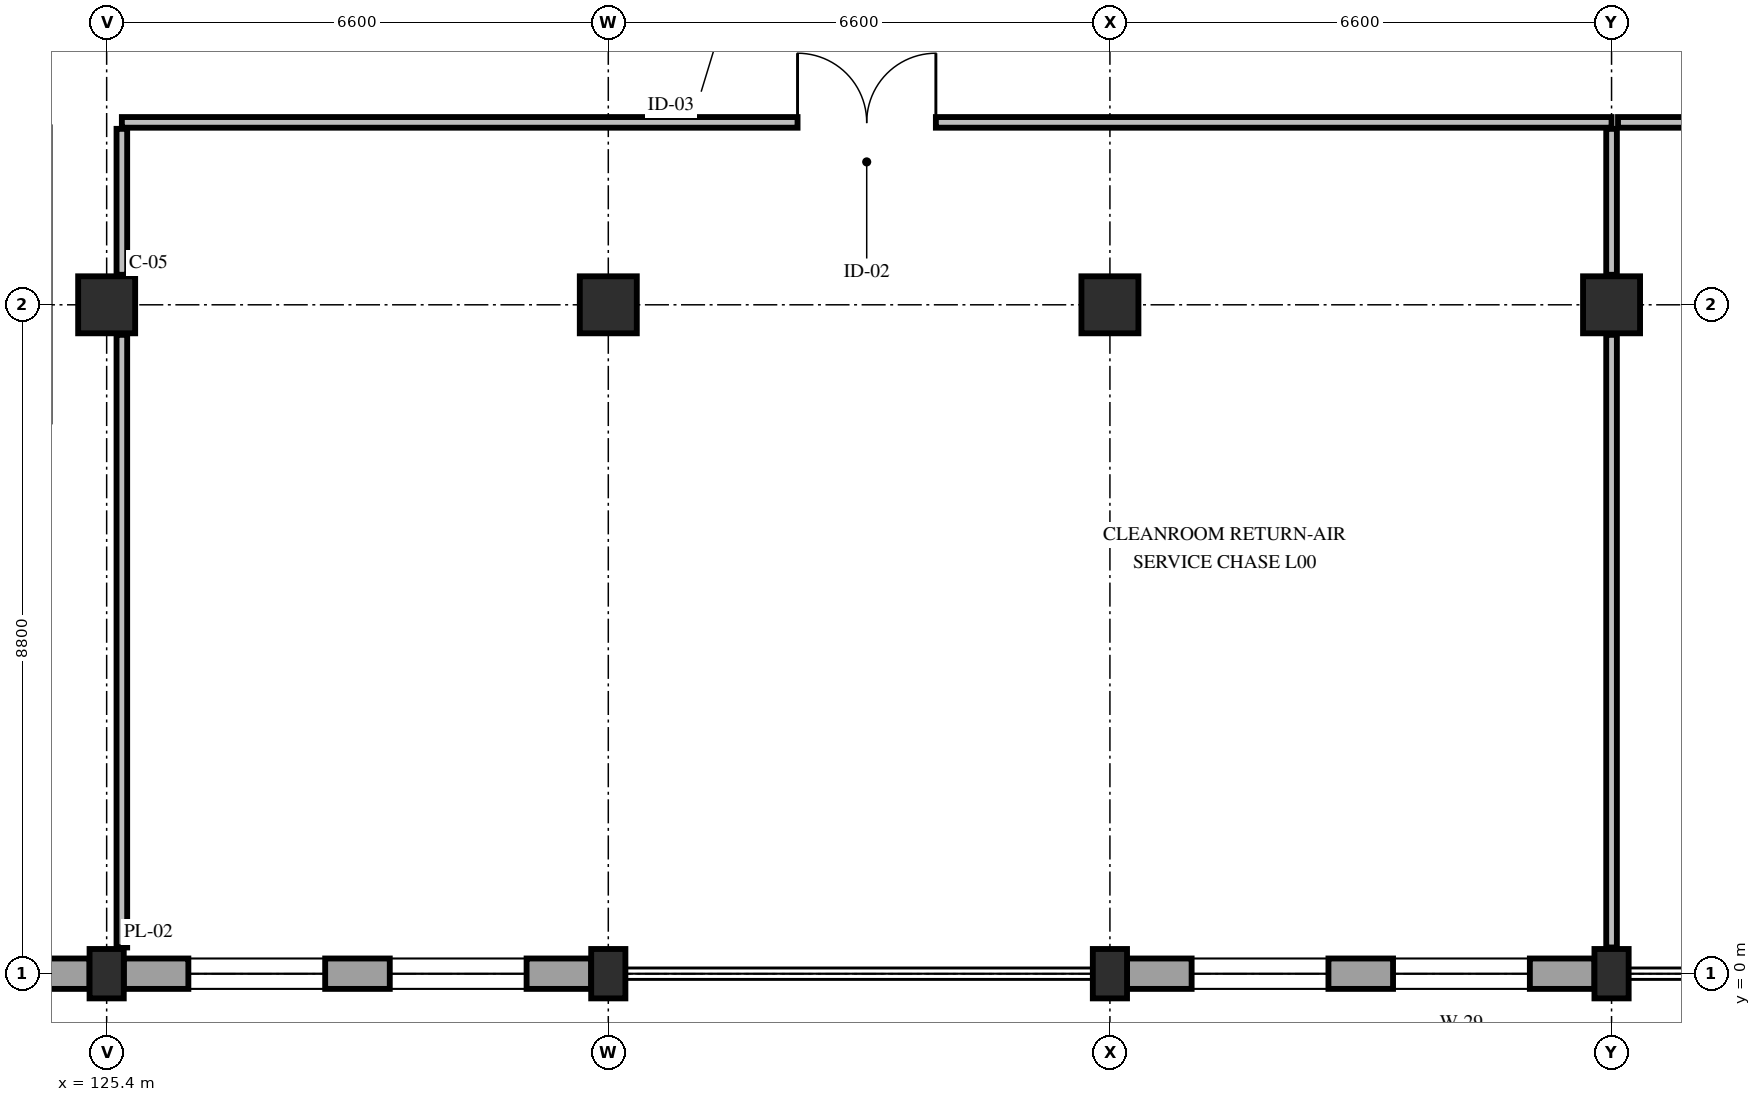
"""IFC4 building model, lengths in metres.
Left out: names, types, materials, properties, quantities, classifications, styles, units other than length and angle.
Written with IfcOpenShell. Run it as: python <this file> out.ifc"""

import sys

from ifc_helpers import new_model, si_unit, direction, frame, frame_2d, origin, origin_2d, place, context, subcontext, project, spatial, rectangle, extrude, element, fill, save


model = new_model("IFC4")
c1 = context("Model", 3, precision=1e-05, world=origin(), true_north=direction((0.0, 1.0)))
c2 = subcontext(c1, "Body", "Model", "MODEL_VIEW")
j1 = project(units=[si_unit("LENGTHUNIT", "METRE"), si_unit("PLANEANGLEUNIT", "RADIAN")], contexts=[c1])
p1 = place(None, origin())
s1 = spatial("IfcSite", under=j1, at=p1, CompositionType="ELEMENT")
p2 = place(p1, origin())
s2 = spatial("IfcBuilding", under=s1, at=p2, CompositionType="ELEMENT")
p3 = place(p2, origin())
s3 = spatial("IfcBuildingStorey", under=s2, at=p3, CompositionType="ELEMENT", Elevation=0.0)
p4 = place(p3, frame((125.4, 0.0, 0.0), z_axis=(0.0, 0.0, 1.0), x_axis=(1.0, 0.0, 0.0)))
e1 = element("IfcColumn", 1, at=p4, inside=s3, PredefinedType="PILASTER", context=c2, shape_type="SweptSolid", body=[
    extrude(rectangle(XDim=0.45, YDim=0.65, at=origin_2d()), origin(), (0.0, 0.0, 1.0), 5.4),
])
p5 = place(p3, frame((125.4, 8.8, 0.0), z_axis=(0.0, 0.0, 1.0), x_axis=(1.0, 0.0, 0.0)))
e2 = element("IfcColumn", 2, at=p5, inside=s3, PredefinedType="COLUMN", context=c2, shape_type="SweptSolid", body=[
    extrude(rectangle(XDim=0.75, YDim=0.75, at=origin_2d()), origin(), (0.0, 0.0, 1.0), 5.4),
])
p6 = place(p3, frame((132.0, 0.0, 0.0), z_axis=(0.0, 0.0, 1.0), x_axis=(1.0, 0.0, 0.0)))
e3 = element("IfcColumn", 3, at=p6, inside=s3, PredefinedType="PILASTER", context=c2, shape_type="SweptSolid", body=[
    extrude(rectangle(XDim=0.45, YDim=0.65, at=origin_2d()), origin(), (0.0, 0.0, 1.0), 5.4),
])
p7 = place(p3, frame((132.0, 8.8, 0.0), z_axis=(0.0, 0.0, 1.0), x_axis=(1.0, 0.0, 0.0)))
e4 = element("IfcColumn", 4, at=p7, inside=s3, PredefinedType="COLUMN", context=c2, shape_type="SweptSolid", body=[
    extrude(rectangle(XDim=0.75, YDim=0.75, at=origin_2d()), origin(), (0.0, 0.0, 1.0), 5.4),
])
p8 = place(p3, frame((138.6, 0.0, 0.0), z_axis=(0.0, 0.0, 1.0), x_axis=(1.0, 0.0, 0.0)))
e5 = element("IfcColumn", 5, at=p8, inside=s3, PredefinedType="PILASTER", context=c2, shape_type="SweptSolid", body=[
    extrude(rectangle(XDim=0.45, YDim=0.65, at=origin_2d()), origin(), (0.0, 0.0, 1.0), 5.4),
])
p9 = place(p3, frame((138.6, 8.8, 0.0), z_axis=(0.0, 0.0, 1.0), x_axis=(1.0, 0.0, 0.0)))
e6 = element("IfcColumn", 6, at=p9, inside=s3, PredefinedType="COLUMN", context=c2, shape_type="SweptSolid", body=[
    extrude(rectangle(XDim=0.75, YDim=0.75, at=origin_2d()), origin(), (0.0, 0.0, 1.0), 5.4),
])
p10 = place(p3, frame((145.2, 0.0, 0.0), z_axis=(0.0, 0.0, 1.0), x_axis=(1.0, 0.0, 0.0)))
e7 = element("IfcColumn", 7, at=p10, inside=s3, PredefinedType="PILASTER", context=c2, shape_type="SweptSolid", body=[
    extrude(rectangle(XDim=0.45, YDim=0.65, at=origin_2d()), origin(), (0.0, 0.0, 1.0), 5.4),
])
p11 = place(p3, frame((145.2, 8.8, 0.0), z_axis=(0.0, 0.0, 1.0), x_axis=(1.0, 0.0, 0.0)))
e8 = element("IfcColumn", 8, at=p11, inside=s3, PredefinedType="COLUMN", context=c2, shape_type="SweptSolid", body=[
    extrude(rectangle(XDim=0.75, YDim=0.75, at=origin_2d()), origin(), (0.0, 0.0, 1.0), 5.4),
])
p12 = place(p3, frame((144.975, 0.0, 0.0), z_axis=(0.0, 0.0, 1.0), x_axis=(-1.0, 0.0, 0.0)))
e9 = element("IfcWall", 9, at=p12, inside=s3, PredefinedType="STANDARD", context=c2, shape_type="SweptSolid", body=[
    extrude(rectangle(XDim=6.15, YDim=0.4, at=frame_2d((3.075, 0.0))), origin(), (0.0, 0.0, 1.0), 4.58),
])
p13 = place(p12, frame((0.85, 0.0, 0.85)))
e10 = element("IfcOpeningElement", 10, at=p13, cuts=e9, PredefinedType="OPENING", context=c2, shape_type="SweptSolid", body=[
    extrude(rectangle(XDim=1.8, YDim=2.04, at=frame_2d((0.9, 1.02))), frame((0.0, 0.215, 0.0), z_axis=(0.0, -1.0, 0.0), x_axis=(1.0, 0.0, 0.0)), (0.0, 0.0, 1.0), 0.43),
])
p14 = place(p12, frame((3.5, 0.0, 0.85)))
e11 = element("IfcOpeningElement", 11, at=p14, cuts=e9, PredefinedType="OPENING", context=c2, shape_type="SweptSolid", body=[
    extrude(rectangle(XDim=1.8, YDim=2.04, at=frame_2d((0.9, 1.02))), frame((0.0, 0.215, 0.0), z_axis=(0.0, -1.0, 0.0), x_axis=(1.0, 0.0, 0.0)), (0.0, 0.0, 1.0), 0.43),
])
p15 = place(p3, frame((131.775, 0.0, 0.0), z_axis=(0.0, 0.0, 1.0), x_axis=(-1.0, 0.0, 0.0)))
e12 = element("IfcWall", 12, at=p15, inside=s3, PredefinedType="STANDARD", context=c2, shape_type="SweptSolid", body=[
    extrude(rectangle(XDim=6.15, YDim=0.4, at=frame_2d((3.075, 0.0))), origin(), (0.0, 0.0, 1.0), 4.58),
])
p16 = place(p15, frame((0.85, 0.0, 0.85)))
e13 = element("IfcOpeningElement", 13, at=p16, cuts=e12, PredefinedType="OPENING", context=c2, shape_type="SweptSolid", body=[
    extrude(rectangle(XDim=1.8, YDim=2.04, at=frame_2d((0.9, 1.02))), frame((0.0, 0.215, 0.0), z_axis=(0.0, -1.0, 0.0), x_axis=(1.0, 0.0, 0.0)), (0.0, 0.0, 1.0), 0.43),
])
p17 = place(p15, frame((3.5, 0.0, 0.85)))
e14 = element("IfcOpeningElement", 14, at=p17, cuts=e12, PredefinedType="OPENING", context=c2, shape_type="SweptSolid", body=[
    extrude(rectangle(XDim=1.8, YDim=2.04, at=frame_2d((0.9, 1.02))), frame((0.0, 0.215, 0.0), z_axis=(0.0, -1.0, 0.0), x_axis=(1.0, 0.0, 0.0)), (0.0, 0.0, 1.0), 0.43),
])
p18 = place(p3, frame((125.175, 0.0, 0.0), z_axis=(0.0, 0.0, 1.0), x_axis=(-1.0, 0.0, 0.0)))
e15 = element("IfcWall", 15, at=p18, inside=s3, PredefinedType="STANDARD", context=c2, shape_type="SweptSolid", body=[
    extrude(rectangle(XDim=6.15, YDim=0.4, at=frame_2d((3.075, 0.0))), origin(), (0.0, 0.0, 1.0), 4.58),
])
p19 = place(p18, frame((2.175, 0.0, 0.0)))
e16 = element("IfcOpeningElement", 16, at=p19, cuts=e15, PredefinedType="OPENING", context=c2, shape_type="SweptSolid", body=[
    extrude(rectangle(XDim=1.8, YDim=2.35, at=frame_2d((0.9, 1.175))), frame((0.0, 0.215, 0.0), z_axis=(0.0, -1.0, 0.0), x_axis=(1.0, 0.0, 0.0)), (0.0, 0.0, 1.0), 0.43),
])
p20 = place(p3, frame((125.6, 11.2, 0.0), z_axis=(0.0, 0.0, 1.0), x_axis=(1.0, 0.0, 0.0)))
e17 = element("IfcWall", 17, at=p20, inside=s3, PredefinedType="PARTITIONING", context=c2, shape_type="SweptSolid", body=[
    extrude(rectangle(XDim=19.6, YDim=0.14, at=frame_2d((9.8, 0.0))), origin(), (0.0, 0.0, 1.0), 4.665),
])
p21 = place(p20, frame((8.89, 0.0, 0.0)))
e18 = element("IfcOpeningElement", 18, at=p21, cuts=e17, PredefinedType="OPENING", context=c2, shape_type="SweptSolid", body=[
    extrude(rectangle(XDim=1.82, YDim=2.35, at=frame_2d((0.91, 1.175))), frame((0.0, 0.085, 0.0), z_axis=(0.0, -1.0, 0.0), x_axis=(1.0, 0.0, 0.0)), (0.0, 0.0, 1.0), 0.17),
])
p22 = place(p3, frame((125.6, 0.345, 0.0), z_axis=(0.0, 0.0, 1.0), x_axis=(0.0, 1.0, 0.0)))
e19 = element("IfcWall", 19, at=p22, inside=s3, PredefinedType="PARTITIONING", context=c2, shape_type="SweptSolid", body=[
    extrude(rectangle(XDim=8.06, YDim=0.14, at=frame_2d((4.03, 0.0))), origin(), (0.0, 0.0, 1.0), 4.665),
])
p23 = place(p3, frame((125.6, 9.195, 0.0), z_axis=(0.0, 0.0, 1.0), x_axis=(0.0, 1.0, 0.0)))
e20 = element("IfcWall", 20, at=p23, inside=s3, PredefinedType="PARTITIONING", context=c2, shape_type="SweptSolid", body=[
    extrude(rectangle(XDim=1.92, YDim=0.14, at=frame_2d((0.96, 0.0))), origin(), (0.0, 0.0, 1.0), 4.665),
])
p24 = place(p3, frame((145.2, 0.345, 0.0), z_axis=(0.0, 0.0, 1.0), x_axis=(0.0, 1.0, 0.0)))
e21 = element("IfcWall", 21, at=p24, inside=s3, PredefinedType="PARTITIONING", context=c2, shape_type="SweptSolid", body=[
    extrude(rectangle(XDim=8.06, YDim=0.14, at=frame_2d((4.03, 0.0))), origin(), (0.0, 0.0, 1.0), 4.665),
])
p25 = place(p3, frame((145.2, 9.195, 0.0), z_axis=(0.0, 0.0, 1.0), x_axis=(0.0, 1.0, 0.0)))
e22 = element("IfcWall", 22, at=p25, inside=s3, PredefinedType="PARTITIONING", context=c2, shape_type="SweptSolid", body=[
    extrude(rectangle(XDim=1.92, YDim=0.14, at=frame_2d((0.96, 0.0))), origin(), (0.0, 0.0, 1.0), 4.665),
])
p26 = place(p3, frame((145.285, 11.2, 0.0), z_axis=(0.0, 0.0, 1.0), x_axis=(1.0, 0.0, 0.0)))
e23 = element("IfcWall", 23, at=p26, inside=s3, PredefinedType="PARTITIONING", context=c2, shape_type="SweptSolid", body=[
    extrude(rectangle(XDim=20.415, YDim=0.14, at=frame_2d((10.208, 0.0))), origin(), (0.0, 0.0, 1.0), 4.665),
])
p27 = place(p26, frame((9.305, 0.0, 0.0)))
e24 = element("IfcOpeningElement", 24, at=p27, cuts=e23, PredefinedType="OPENING", context=c2, shape_type="SweptSolid", body=[
    extrude(rectangle(XDim=1.72, YDim=2.35, at=frame_2d((0.86, 1.175))), frame((0.0, 0.085, 0.0), z_axis=(0.0, -1.0, 0.0), x_axis=(1.0, 0.0, 0.0)), (0.0, 0.0, 1.0), 0.17),
])
p28 = place(p13, origin())
e25 = element("IfcWindow", 25, at=p28, inside=s3, PartitioningType="DOUBLE_PANEL_VERTICAL", PredefinedType="WINDOW", context=c2, shape_type="SweptSolid", body=[
    extrude(rectangle(XDim=1.8, YDim=2.04, at=frame_2d((0.9, 1.02))), frame((0.0, 0.03, 0.0), z_axis=(0.0, -1.0, 0.0), x_axis=(1.0, 0.0, 0.0)), (0.0, 0.0, 1.0), 0.06),
])
fill(e10, e25)
p29 = place(p14, origin())
e26 = element("IfcWindow", 26, at=p29, inside=s3, PartitioningType="DOUBLE_PANEL_VERTICAL", PredefinedType="WINDOW", context=c2, shape_type="SweptSolid", body=[
    extrude(rectangle(XDim=1.8, YDim=2.04, at=frame_2d((0.9, 1.02))), frame((0.0, 0.03, 0.0), z_axis=(0.0, -1.0, 0.0), x_axis=(1.0, 0.0, 0.0)), (0.0, 0.0, 1.0), 0.06),
])
fill(e11, e26)
p30 = place(p16, origin())
e27 = element("IfcWindow", 27, at=p30, inside=s3, PartitioningType="DOUBLE_PANEL_VERTICAL", PredefinedType="WINDOW", context=c2, shape_type="SweptSolid", body=[
    extrude(rectangle(XDim=1.8, YDim=2.04, at=frame_2d((0.9, 1.02))), frame((0.0, 0.03, 0.0), z_axis=(0.0, -1.0, 0.0), x_axis=(1.0, 0.0, 0.0)), (0.0, 0.0, 1.0), 0.06),
])
fill(e13, e27)
p31 = place(p17, origin())
e28 = element("IfcWindow", 28, at=p31, inside=s3, PartitioningType="DOUBLE_PANEL_VERTICAL", PredefinedType="WINDOW", context=c2, shape_type="SweptSolid", body=[
    extrude(rectangle(XDim=1.8, YDim=2.04, at=frame_2d((0.9, 1.02))), frame((0.0, 0.03, 0.0), z_axis=(0.0, -1.0, 0.0), x_axis=(1.0, 0.0, 0.0)), (0.0, 0.0, 1.0), 0.06),
])
fill(e14, e28)
p32 = place(p21, origin())
e29 = element("IfcDoor", 29, at=p32, inside=s3, OperationType="DOUBLE_DOOR_SINGLE_SWING", PredefinedType="DOOR", context=c2, shape_type="SweptSolid", body=[
    extrude(rectangle(XDim=1.82, YDim=2.35, at=frame_2d((0.91, 1.175))), frame((0.0, 0.025, 0.0), z_axis=(0.0, -1.0, 0.0), x_axis=(1.0, 0.0, 0.0)), (0.0, 0.0, 1.0), 0.05),
])
fill(e18, e29)
save(model, sys.argv[1])
